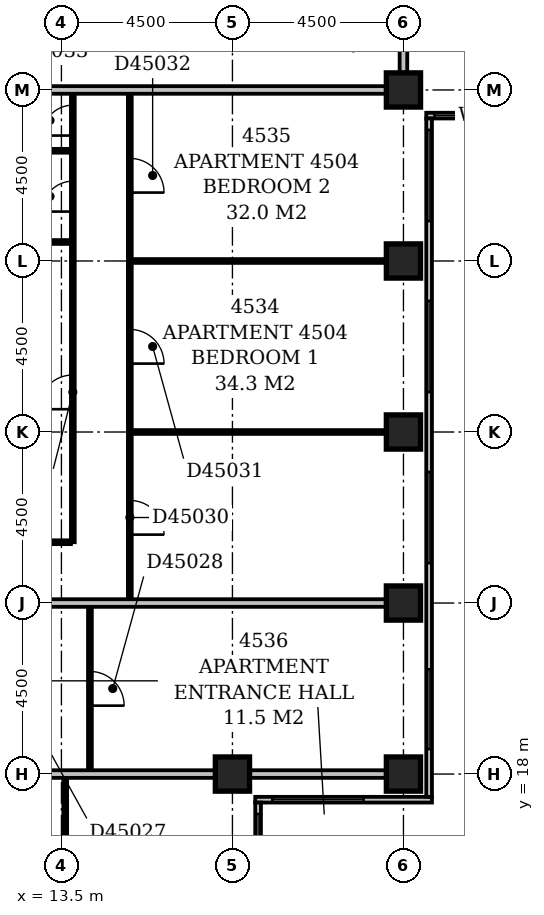
"""IFC4 building model, lengths in metres.
Left out: names, types, materials, properties, quantities, classifications, styles, units other than length and angle.
Written with IfcOpenShell. Run it as: python <this file> out.ifc"""

import sys

from ifc_helpers import new_model, si_unit, direction, frame, frame_2d, origin, origin_2d, place, context, subcontext, project, spatial, rectangle, extrude, element, fill, save


model = new_model("IFC4")
c1 = context("Model", 3, precision=1e-05, world=origin(), true_north=direction((0.0, 1.0)))
c2 = subcontext(c1, "Body", "Model", "MODEL_VIEW")
j1 = project(units=[si_unit("LENGTHUNIT", "METRE"), si_unit("PLANEANGLEUNIT", "RADIAN")], contexts=[c1])
p1 = place(None, origin())
s1 = spatial("IfcSite", under=j1, at=p1, CompositionType="ELEMENT")
p2 = place(p1, origin())
s2 = spatial("IfcBuilding", under=s1, at=p2, CompositionType="ELEMENT")
p3 = place(p2, frame((0.0, 0.0, 179.0)))
s3 = spatial("IfcBuildingStorey", under=s2, at=p3, CompositionType="ELEMENT", Elevation=179.0)
for number, where, z_axis, x_axis in (
    (1, (18.0, 18.0, -0.3), (0.0, 0.0, 1.0), (1.0, 0.0, 0.0)),
    (2, (22.5, 18.0, -0.3), (0.0, 0.0, 1.0), (1.0, 0.0, 0.0)),
    (3, (22.5, 22.5, -0.3), (0.0, 0.0, 1.0), (1.0, 0.0, 0.0)),
    (4, (22.5, 27.0, -0.3), (0.0, 0.0, 1.0), (1.0, 0.0, 0.0)),
    (5, (22.5, 31.5, -0.3), (0.0, 0.0, 1.0), (1.0, 0.0, 0.0)),
    (6, (22.5, 36.0, -0.3), (0.0, 0.0, 1.0), (1.0, 0.0, 0.0)),
):
    element("IfcColumn", number, at=place(p3, frame(where, z_axis=z_axis, x_axis=x_axis)), inside=s3, PredefinedType="COLUMN", context=c2, shape_type="SweptSolid", body=[
        extrude(rectangle(XDim=0.9, YDim=0.9, at=origin_2d()), origin(), (0.0, 0.0, 1.0), 3.6),
    ])
p4 = place(p3, frame((18.675, 8.4, 0.0), z_axis=(0.0, 0.0, 1.0), x_axis=(0.0, 1.0, 0.0)))
e7 = element("IfcWall", 7, at=p4, inside=s3, PredefinedType="STANDARD", context=c2, shape_type="SweptSolid", body=[
    extrude(rectangle(XDim=8.85, YDim=0.15, at=frame_2d((4.425, 0.0))), origin(), (0.0, 0.0, 1.0), 2.7),
])
p5 = place(p4, frame((1.291, 0.0, 0.6)))
e8 = element("IfcOpeningElement", 8, at=p5, cuts=e7, PredefinedType="OPENING", context=c2, shape_type="SweptSolid", body=[
    extrude(rectangle(XDim=0.45, YDim=1.8, at=frame_2d((0.225, 0.9))), frame((0.0, 0.087, 0.0), z_axis=(0.0, -1.0, 0.0), x_axis=(1.0, 0.0, 0.0)), (0.0, 0.0, 1.0), 0.174),
])
p6 = place(p4, frame((2.941, 0.0, 0.6)))
e9 = element("IfcOpeningElement", 9, at=p6, cuts=e7, PredefinedType="OPENING", context=c2, shape_type="SweptSolid", body=[
    extrude(rectangle(XDim=1.5, YDim=1.8, at=frame_2d((0.75, 0.9))), frame((0.0, 0.087, 0.0), z_axis=(0.0, -1.0, 0.0), x_axis=(1.0, 0.0, 0.0)), (0.0, 0.0, 1.0), 0.174),
])
p7 = place(p4, frame((6.15, 0.0, 0.6)))
e10 = element("IfcOpeningElement", 10, at=p7, cuts=e7, PredefinedType="OPENING", context=c2, shape_type="SweptSolid", body=[
    extrude(rectangle(XDim=2.4, YDim=1.8, at=frame_2d((1.2, 0.9))), frame((0.0, 0.087, 0.0), z_axis=(0.0, -1.0, 0.0), x_axis=(1.0, 0.0, 0.0)), (0.0, 0.0, 1.0), 0.174),
])
p8 = place(p3, frame((18.6, 17.325, 0.0), z_axis=(0.0, 0.0, 1.0), x_axis=(1.0, 0.0, 0.0)))
e11 = element("IfcWall", 11, at=p8, inside=s3, PredefinedType="STANDARD", context=c2, shape_type="SweptSolid", body=[
    extrude(rectangle(XDim=4.65, YDim=0.15, at=frame_2d((2.325, 0.0))), origin(), (0.0, 0.0, 1.0), 2.7),
])
p9 = place(p8, frame((0.45, 0.0, 0.6)))
e12 = element("IfcOpeningElement", 12, at=p9, cuts=e11, PredefinedType="OPENING", context=c2, shape_type="SweptSolid", body=[
    extrude(rectangle(XDim=2.4, YDim=1.8, at=frame_2d((1.2, 0.9))), frame((0.0, 0.087, 0.0), z_axis=(0.0, -1.0, 0.0), x_axis=(1.0, 0.0, 0.0)), (0.0, 0.0, 1.0), 0.174),
])
p10 = place(p3, frame((23.175, 17.4, 0.0), z_axis=(0.0, 0.0, 1.0), x_axis=(0.0, 1.0, 0.0)))
e13 = element("IfcWall", 13, at=p10, inside=s3, PredefinedType="STANDARD", context=c2, shape_type="SweptSolid", body=[
    extrude(rectangle(XDim=17.85, YDim=0.15, at=frame_2d((8.925, 0.0))), origin(), (0.0, 0.0, 1.0), 2.7),
])
p11 = place(p10, frame((1.257, 0.0, 0.6)))
e14 = element("IfcOpeningElement", 14, at=p11, cuts=e13, PredefinedType="OPENING", context=c2, shape_type="SweptSolid", body=[
    extrude(rectangle(XDim=2.1, YDim=1.8, at=frame_2d((1.05, 0.9))), frame((0.0, 0.087, 0.0), z_axis=(0.0, -1.0, 0.0), x_axis=(1.0, 0.0, 0.0)), (0.0, 0.0, 1.0), 0.174),
])
p12 = place(p10, frame((6.15, 0.0, 0.6)))
e15 = element("IfcOpeningElement", 15, at=p12, cuts=e13, PredefinedType="OPENING", context=c2, shape_type="SweptSolid", body=[
    extrude(rectangle(XDim=2.4, YDim=1.8, at=frame_2d((1.2, 0.9))), frame((0.0, 0.087, 0.0), z_axis=(0.0, -1.0, 0.0), x_axis=(1.0, 0.0, 0.0)), (0.0, 0.0, 1.0), 0.174),
])
p13 = place(p10, frame((10.65, 0.0, 0.6)))
e16 = element("IfcOpeningElement", 16, at=p13, cuts=e13, PredefinedType="OPENING", context=c2, shape_type="SweptSolid", body=[
    extrude(rectangle(XDim=2.4, YDim=1.8, at=frame_2d((1.2, 0.9))), frame((0.0, 0.087, 0.0), z_axis=(0.0, -1.0, 0.0), x_axis=(1.0, 0.0, 0.0)), (0.0, 0.0, 1.0), 0.174),
])
p14 = place(p10, frame((15.15, 0.0, 0.6)))
e17 = element("IfcOpeningElement", 17, at=p14, cuts=e13, PredefinedType="OPENING", context=c2, shape_type="SweptSolid", body=[
    extrude(rectangle(XDim=2.4, YDim=1.8, at=frame_2d((1.2, 0.9))), frame((0.0, 0.087, 0.0), z_axis=(0.0, -1.0, 0.0), x_axis=(1.0, 0.0, 0.0)), (0.0, 0.0, 1.0), 0.174),
])
p15 = place(p3, frame((23.1, 35.325, 0.0), z_axis=(0.0, 0.0, 1.0), x_axis=(1.0, 0.0, 0.0)))
e18 = element("IfcWall", 18, at=p15, inside=s3, PredefinedType="STANDARD", context=c2, shape_type="SweptSolid", body=[
    extrude(rectangle(XDim=45.15, YDim=0.15, at=frame_2d((22.575, 0.0))), origin(), (0.0, 0.0, 1.0), 2.7),
])
p16 = place(p15, frame((0.217, 0.0, 0.6)))
e19 = element("IfcOpeningElement", 19, at=p16, cuts=e18, PredefinedType="OPENING", context=c2, shape_type="SweptSolid", body=[
    extrude(rectangle(XDim=2.1, YDim=1.8, at=frame_2d((1.05, 0.9))), frame((0.0, 0.087, 0.0), z_axis=(0.0, -1.0, 0.0), x_axis=(1.0, 0.0, 0.0)), (0.0, 0.0, 1.0), 0.174),
])
p17 = place(p15, frame((4.95, 0.0, 0.6)))
e20 = element("IfcOpeningElement", 20, at=p17, cuts=e18, PredefinedType="OPENING", context=c2, shape_type="SweptSolid", body=[
    extrude(rectangle(XDim=2.4, YDim=1.8, at=frame_2d((1.2, 0.9))), frame((0.0, 0.087, 0.0), z_axis=(0.0, -1.0, 0.0), x_axis=(1.0, 0.0, 0.0)), (0.0, 0.0, 1.0), 0.174),
])
p18 = place(p15, frame((9.45, 0.0, 0.6)))
e21 = element("IfcOpeningElement", 21, at=p18, cuts=e18, PredefinedType="OPENING", context=c2, shape_type="SweptSolid", body=[
    extrude(rectangle(XDim=2.4, YDim=1.8, at=frame_2d((1.2, 0.9))), frame((0.0, 0.087, 0.0), z_axis=(0.0, -1.0, 0.0), x_axis=(1.0, 0.0, 0.0)), (0.0, 0.0, 1.0), 0.174),
])
p19 = place(p15, frame((13.95, 0.0, 0.6)))
e22 = element("IfcOpeningElement", 22, at=p19, cuts=e18, PredefinedType="OPENING", context=c2, shape_type="SweptSolid", body=[
    extrude(rectangle(XDim=2.4, YDim=1.8, at=frame_2d((1.2, 0.9))), frame((0.0, 0.087, 0.0), z_axis=(0.0, -1.0, 0.0), x_axis=(1.0, 0.0, 0.0)), (0.0, 0.0, 1.0), 0.174),
])
p20 = place(p15, frame((18.45, 0.0, 0.6)))
e23 = element("IfcOpeningElement", 23, at=p20, cuts=e18, PredefinedType="OPENING", context=c2, shape_type="SweptSolid", body=[
    extrude(rectangle(XDim=2.4, YDim=1.8, at=frame_2d((1.2, 0.9))), frame((0.0, 0.087, 0.0), z_axis=(0.0, -1.0, 0.0), x_axis=(1.0, 0.0, 0.0)), (0.0, 0.0, 1.0), 0.174),
])
p21 = place(p15, frame((24.403, 0.0, 0.6)))
e24 = element("IfcOpeningElement", 24, at=p21, cuts=e18, PredefinedType="OPENING", context=c2, shape_type="SweptSolid", body=[
    extrude(rectangle(XDim=1.2, YDim=1.8, at=frame_2d((0.6, 0.9))), frame((0.0, 0.087, 0.0), z_axis=(0.0, -1.0, 0.0), x_axis=(1.0, 0.0, 0.0)), (0.0, 0.0, 1.0), 0.174),
])
p22 = place(p15, frame((27.141, 0.0, 0.6)))
e25 = element("IfcOpeningElement", 25, at=p22, cuts=e18, PredefinedType="OPENING", context=c2, shape_type="SweptSolid", body=[
    extrude(rectangle(XDim=2.1, YDim=1.8, at=frame_2d((1.05, 0.9))), frame((0.0, 0.087, 0.0), z_axis=(0.0, -1.0, 0.0), x_axis=(1.0, 0.0, 0.0)), (0.0, 0.0, 1.0), 0.174),
])
p23 = place(p15, frame((31.95, 0.0, 0.6)))
e26 = element("IfcOpeningElement", 26, at=p23, cuts=e18, PredefinedType="OPENING", context=c2, shape_type="SweptSolid", body=[
    extrude(rectangle(XDim=2.4, YDim=1.8, at=frame_2d((1.2, 0.9))), frame((0.0, 0.087, 0.0), z_axis=(0.0, -1.0, 0.0), x_axis=(1.0, 0.0, 0.0)), (0.0, 0.0, 1.0), 0.174),
])
p24 = place(p15, frame((36.45, 0.0, 0.6)))
e27 = element("IfcOpeningElement", 27, at=p24, cuts=e18, PredefinedType="OPENING", context=c2, shape_type="SweptSolid", body=[
    extrude(rectangle(XDim=2.4, YDim=1.8, at=frame_2d((1.2, 0.9))), frame((0.0, 0.087, 0.0), z_axis=(0.0, -1.0, 0.0), x_axis=(1.0, 0.0, 0.0)), (0.0, 0.0, 1.0), 0.174),
])
p25 = place(p15, frame((40.95, 0.0, 0.6)))
e28 = element("IfcOpeningElement", 28, at=p25, cuts=e18, PredefinedType="OPENING", context=c2, shape_type="SweptSolid", body=[
    extrude(rectangle(XDim=2.4, YDim=1.8, at=frame_2d((1.2, 0.9))), frame((0.0, 0.087, 0.0), z_axis=(0.0, -1.0, 0.0), x_axis=(1.0, 0.0, 0.0)), (0.0, 0.0, 1.0), 0.174),
])
p26 = place(p3, frame((13.6, 9.45, 0.0), z_axis=(0.0, 0.0, 1.0), x_axis=(0.0, 1.0, 0.0)))
e29 = element("IfcWall", 29, at=p26, inside=s3, PredefinedType="PARTITIONING", context=c2, shape_type="SweptSolid", body=[
    extrude(rectangle(XDim=8.45, YDim=0.1, at=frame_2d((4.225, 0.0))), origin(), (0.0, 0.0, 1.0), 3.3),
])
p27 = place(p26, frame((1.35, 0.0, 0.0)))
e30 = element("IfcOpeningElement", 30, at=p27, cuts=e29, PredefinedType="OPENING", context=c2, shape_type="SweptSolid", body=[
    extrude(rectangle(XDim=0.9, YDim=2.1, at=frame_2d((0.45, 1.05))), frame((0.0, 0.062, 0.0), z_axis=(0.0, -1.0, 0.0), x_axis=(1.0, 0.0, 0.0)), (0.0, 0.0, 1.0), 0.124),
])
p28 = place(p26, frame((5.85, 0.0, 0.0)))
e31 = element("IfcOpeningElement", 31, at=p28, cuts=e29, PredefinedType="OPENING", context=c2, shape_type="SweptSolid", body=[
    extrude(rectangle(XDim=0.9, YDim=2.1, at=frame_2d((0.45, 1.05))), frame((0.0, 0.062, 0.0), z_axis=(0.0, -1.0, 0.0), x_axis=(1.0, 0.0, 0.0)), (0.0, 0.0, 1.0), 0.124),
])
p29 = place(p3, frame((9.1, 18.0, 0.0), z_axis=(0.0, 0.0, 1.0), x_axis=(1.0, 0.0, 0.0)))
e32 = element("IfcWall", 32, at=p29, inside=s3, PredefinedType="PARTITIONING", context=c2, shape_type="SweptSolid", body=[
    extrude(rectangle(XDim=8.45, YDim=0.2, at=frame_2d((4.225, 0.0))), origin(), (0.0, 0.0, 1.0), 2.6),
])
p30 = place(p3, frame((18.45, 18.0, 0.0), z_axis=(0.0, 0.0, 1.0), x_axis=(1.0, 0.0, 0.0)))
e33 = element("IfcWall", 33, at=p30, inside=s3, PredefinedType="PARTITIONING", context=c2, shape_type="SweptSolid", body=[
    extrude(rectangle(XDim=3.6, YDim=0.2, at=frame_2d((1.8, 0.0))), origin(), (0.0, 0.0, 1.0), 2.7),
])
p31 = place(p3, frame((14.25, 18.1, 0.0), z_axis=(0.0, 0.0, 1.0), x_axis=(0.0, 1.0, 0.0)))
e34 = element("IfcWall", 34, at=p31, inside=s3, PredefinedType="PARTITIONING", context=c2, shape_type="SweptSolid", body=[
    extrude(rectangle(XDim=4.3, YDim=0.1, at=frame_2d((2.15, 0.0))), origin(), (0.0, 0.0, 1.0), 3.3),
])
p32 = place(p31, frame((1.7, 0.0, 0.0)))
e35 = element("IfcOpeningElement", 35, at=p32, cuts=e34, PredefinedType="OPENING", context=c2, shape_type="SweptSolid", body=[
    extrude(rectangle(XDim=0.9, YDim=2.1, at=frame_2d((0.45, 1.05))), frame((0.0, 0.062, 0.0), z_axis=(0.0, -1.0, 0.0), x_axis=(1.0, 0.0, 0.0)), (0.0, 0.0, 1.0), 0.124),
])
p33 = place(p3, frame((9.1, 22.5, 0.0), z_axis=(0.0, 0.0, 1.0), x_axis=(1.0, 0.0, 0.0)))
e36 = element("IfcWall", 36, at=p33, inside=s3, PredefinedType="PARTITIONING", context=c2, shape_type="SweptSolid", body=[
    extrude(rectangle(XDim=12.95, YDim=0.2, at=frame_2d((6.475, 0.0))), origin(), (0.0, 0.0, 1.0), 3.3),
])
p34 = place(p3, frame((15.3, 22.6, 0.0), z_axis=(0.0, 0.0, 1.0), x_axis=(0.0, 1.0, 0.0)))
e37 = element("IfcWall", 37, at=p34, inside=s3, PredefinedType="PARTITIONING", context=c2, shape_type="SweptSolid", body=[
    extrude(rectangle(XDim=13.3, YDim=0.1, at=frame_2d((6.65, 0.0))), origin(), (0.0, 0.0, 1.0), 3.3),
])
p35 = place(p34, frame((1.7, 0.0, 0.0)))
e38 = element("IfcOpeningElement", 38, at=p35, cuts=e37, PredefinedType="OPENING", context=c2, shape_type="SweptSolid", body=[
    extrude(rectangle(XDim=0.9, YDim=2.1, at=frame_2d((0.45, 1.05))), frame((0.0, 0.062, 0.0), z_axis=(0.0, -1.0, 0.0), x_axis=(1.0, 0.0, 0.0)), (0.0, 0.0, 1.0), 0.124),
])
p36 = place(p34, frame((6.2, 0.0, 0.0)))
e39 = element("IfcOpeningElement", 39, at=p36, cuts=e37, PredefinedType="OPENING", context=c2, shape_type="SweptSolid", body=[
    extrude(rectangle(XDim=0.9, YDim=2.1, at=frame_2d((0.45, 1.05))), frame((0.0, 0.062, 0.0), z_axis=(0.0, -1.0, 0.0), x_axis=(1.0, 0.0, 0.0)), (0.0, 0.0, 1.0), 0.124),
])
p37 = place(p34, frame((10.7, 0.0, 0.0)))
e40 = element("IfcOpeningElement", 40, at=p37, cuts=e37, PredefinedType="OPENING", context=c2, shape_type="SweptSolid", body=[
    extrude(rectangle(XDim=0.9, YDim=2.1, at=frame_2d((0.45, 1.05))), frame((0.0, 0.062, 0.0), z_axis=(0.0, -1.0, 0.0), x_axis=(1.0, 0.0, 0.0)), (0.0, 0.0, 1.0), 0.124),
])
p38 = place(p3, frame((9.1, 24.1, 0.0), z_axis=(0.0, 0.0, 1.0), x_axis=(1.0, 0.0, 0.0)))
e41 = element("IfcWall", 41, at=p38, inside=s3, PredefinedType="PARTITIONING", context=c2, shape_type="SweptSolid", body=[
    extrude(rectangle(XDim=4.65, YDim=0.1, at=frame_2d((2.325, 0.0))), origin(), (0.0, 0.0, 1.0), 3.3),
])
p39 = place(p3, frame((13.8, 24.1, 0.0), z_axis=(0.0, 0.0, 1.0), x_axis=(0.0, 1.0, 0.0)))
e42 = element("IfcWall", 42, at=p39, inside=s3, PredefinedType="PARTITIONING", context=c2, shape_type="SweptSolid", body=[
    extrude(rectangle(XDim=11.8, YDim=0.1, at=frame_2d((5.9, 0.0))), origin(), (0.0, 0.0, 1.0), 3.3),
])
p40 = place(p39, frame((8.7, 0.0, 0.0)))
e43 = element("IfcOpeningElement", 43, at=p40, cuts=e42, PredefinedType="OPENING", context=c2, shape_type="SweptSolid", body=[
    extrude(rectangle(XDim=0.8, YDim=2.1, at=frame_2d((0.4, 1.05))), frame((0.0, 0.062, 0.0), z_axis=(0.0, -1.0, 0.0), x_axis=(1.0, 0.0, 0.0)), (0.0, 0.0, 1.0), 0.124),
])
p41 = place(p39, frame((3.5, 0.0, 0.0)))
e44 = element("IfcOpeningElement", 44, at=p41, cuts=e42, PredefinedType="OPENING", context=c2, shape_type="SweptSolid", body=[
    extrude(rectangle(XDim=0.9, YDim=2.1, at=frame_2d((0.45, 1.05))), frame((0.0, 0.062, 0.0), z_axis=(0.0, -1.0, 0.0), x_axis=(1.0, 0.0, 0.0)), (0.0, 0.0, 1.0), 0.124),
])
p42 = place(p39, frame((10.7, 0.0, 0.0)))
e45 = element("IfcOpeningElement", 45, at=p42, cuts=e42, PredefinedType="OPENING", context=c2, shape_type="SweptSolid", body=[
    extrude(rectangle(XDim=0.8, YDim=2.1, at=frame_2d((0.4, 1.05))), frame((0.0, 0.062, 0.0), z_axis=(0.0, -1.0, 0.0), x_axis=(1.0, 0.0, 0.0)), (0.0, 0.0, 1.0), 0.124),
])
p43 = place(p3, frame((15.35, 27.0, 0.0), z_axis=(0.0, 0.0, 1.0), x_axis=(1.0, 0.0, 0.0)))
e46 = element("IfcWall", 46, at=p43, inside=s3, PredefinedType="PARTITIONING", context=c2, shape_type="SweptSolid", body=[
    extrude(rectangle(XDim=6.7, YDim=0.1, at=frame_2d((3.35, 0.0))), origin(), (0.0, 0.0, 1.0), 2.7),
])
p44 = place(p3, frame((15.35, 31.5, 0.0), z_axis=(0.0, 0.0, 1.0), x_axis=(1.0, 0.0, 0.0)))
e47 = element("IfcWall", 47, at=p44, inside=s3, PredefinedType="PARTITIONING", context=c2, shape_type="SweptSolid", body=[
    extrude(rectangle(XDim=6.7, YDim=0.1, at=frame_2d((3.35, 0.0))), origin(), (0.0, 0.0, 1.0), 3.3),
])
for number, where, z_axis, x_axis in (
    (48, (9.1, 32.0, 0.0), (0.0, 0.0, 1.0), (1.0, 0.0, 0.0)),
    (49, (9.1, 34.4, 0.0), (0.0, 0.0, 1.0), (1.0, 0.0, 0.0)),
):
    element("IfcWall", number, at=place(p3, frame(where, z_axis=z_axis, x_axis=x_axis)), inside=s3, PredefinedType="PLUMBINGWALL", context=c2, shape_type="SweptSolid", body=[
        extrude(rectangle(XDim=4.65, YDim=0.1, at=frame_2d((2.325, 0.0))), origin(), (0.0, 0.0, 1.0), 3.3),
    ])
p45 = place(p3, frame((9.1, 36.0, 0.0), z_axis=(0.0, 0.0, 1.0), x_axis=(1.0, 0.0, 0.0)))
e50 = element("IfcWall", 50, at=p45, inside=s3, PredefinedType="PARTITIONING", context=c2, shape_type="SweptSolid", body=[
    extrude(rectangle(XDim=12.95, YDim=0.2, at=frame_2d((6.475, 0.0))), origin(), (0.0, 0.0, 1.0), 3.3),
])
p46 = place(p3, frame((22.5, 36.45, 0.0), z_axis=(0.0, 0.0, 1.0), x_axis=(0.0, 1.0, 0.0)))
e51 = element("IfcWall", 51, at=p46, inside=s3, PredefinedType="PARTITIONING", context=c2, shape_type="SweptSolid", body=[
    extrude(rectangle(XDim=13.05, YDim=0.2, at=frame_2d((6.525, 0.0))), origin(), (0.0, 0.0, 1.0), 3.3),
])
p47 = place(p7, origin())
e52 = element("IfcWindow", 52, at=p47, inside=s3, PartitioningType="SINGLE_PANEL", PredefinedType="WINDOW", context=c2, shape_type="SweptSolid", body=[
    extrude(rectangle(XDim=2.4, YDim=1.8, at=frame_2d((1.2, 0.9))), frame((0.0, 0.03, 0.0), z_axis=(0.0, -1.0, 0.0), x_axis=(1.0, 0.0, 0.0)), (0.0, 0.0, 1.0), 0.06),
])
fill(e10, e52)
p48 = place(p9, origin())
e53 = element("IfcWindow", 53, at=p48, inside=s3, PartitioningType="SINGLE_PANEL", PredefinedType="WINDOW", context=c2, shape_type="SweptSolid", body=[
    extrude(rectangle(XDim=2.4, YDim=1.8, at=frame_2d((1.2, 0.9))), frame((0.0, 0.03, 0.0), z_axis=(0.0, -1.0, 0.0), x_axis=(1.0, 0.0, 0.0)), (0.0, 0.0, 1.0), 0.06),
])
fill(e12, e53)
p49 = place(p11, origin())
e54 = element("IfcWindow", 54, at=p49, inside=s3, PartitioningType="SINGLE_PANEL", PredefinedType="WINDOW", context=c2, shape_type="SweptSolid", body=[
    extrude(rectangle(XDim=2.1, YDim=1.8, at=frame_2d((1.05, 0.9))), frame((0.0, 0.03, 0.0), z_axis=(0.0, -1.0, 0.0), x_axis=(1.0, 0.0, 0.0)), (0.0, 0.0, 1.0), 0.06),
])
fill(e14, e54)
p50 = place(p12, origin())
e55 = element("IfcWindow", 55, at=p50, inside=s3, PartitioningType="SINGLE_PANEL", PredefinedType="WINDOW", context=c2, shape_type="SweptSolid", body=[
    extrude(rectangle(XDim=2.4, YDim=1.8, at=frame_2d((1.2, 0.9))), frame((0.0, 0.03, 0.0), z_axis=(0.0, -1.0, 0.0), x_axis=(1.0, 0.0, 0.0)), (0.0, 0.0, 1.0), 0.06),
])
fill(e15, e55)
p51 = place(p13, origin())
e56 = element("IfcWindow", 56, at=p51, inside=s3, PartitioningType="SINGLE_PANEL", PredefinedType="WINDOW", context=c2, shape_type="SweptSolid", body=[
    extrude(rectangle(XDim=2.4, YDim=1.8, at=frame_2d((1.2, 0.9))), frame((0.0, 0.03, 0.0), z_axis=(0.0, -1.0, 0.0), x_axis=(1.0, 0.0, 0.0)), (0.0, 0.0, 1.0), 0.06),
])
fill(e16, e56)
p52 = place(p14, origin())
e57 = element("IfcWindow", 57, at=p52, inside=s3, PartitioningType="SINGLE_PANEL", PredefinedType="WINDOW", context=c2, shape_type="SweptSolid", body=[
    extrude(rectangle(XDim=2.4, YDim=1.8, at=frame_2d((1.2, 0.9))), frame((0.0, 0.03, 0.0), z_axis=(0.0, -1.0, 0.0), x_axis=(1.0, 0.0, 0.0)), (0.0, 0.0, 1.0), 0.06),
])
fill(e17, e57)
p53 = place(p16, origin())
e58 = element("IfcWindow", 58, at=p53, inside=s3, PartitioningType="SINGLE_PANEL", PredefinedType="WINDOW", context=c2, shape_type="SweptSolid", body=[
    extrude(rectangle(XDim=2.1, YDim=1.8, at=frame_2d((1.05, 0.9))), frame((0.0, 0.03, 0.0), z_axis=(0.0, -1.0, 0.0), x_axis=(1.0, 0.0, 0.0)), (0.0, 0.0, 1.0), 0.06),
])
fill(e19, e58)
p54 = place(p32, frame((0.9, 0.0, 0.0), z_axis=(0.0, 0.0, 1.0), x_axis=(-1.0, 0.0, 0.0)))
e59 = element("IfcDoor", 59, at=p54, inside=s3, OperationType="SINGLE_SWING_RIGHT", PredefinedType="DOOR", context=c2, shape_type="SweptSolid", body=[
    extrude(rectangle(XDim=0.9, YDim=2.1, at=frame_2d((0.45, 1.05))), frame((0.0, 0.025, 0.0), z_axis=(0.0, -1.0, 0.0), x_axis=(1.0, 0.0, 0.0)), (0.0, 0.0, 1.0), 0.05),
])
fill(e35, e59)
p55 = place(p35, frame((0.9, 0.0, 0.0), z_axis=(0.0, 0.0, 1.0), x_axis=(-1.0, 0.0, 0.0)))
e60 = element("IfcDoor", 60, at=p55, inside=s3, OperationType="SINGLE_SWING_RIGHT", PredefinedType="DOOR", context=c2, shape_type="SweptSolid", body=[
    extrude(rectangle(XDim=0.9, YDim=2.1, at=frame_2d((0.45, 1.05))), frame((0.0, 0.025, 0.0), z_axis=(0.0, -1.0, 0.0), x_axis=(1.0, 0.0, 0.0)), (0.0, 0.0, 1.0), 0.05),
])
fill(e38, e60)
p56 = place(p36, frame((0.9, 0.0, 0.0), z_axis=(0.0, 0.0, 1.0), x_axis=(-1.0, 0.0, 0.0)))
e61 = element("IfcDoor", 61, at=p56, inside=s3, OperationType="SINGLE_SWING_RIGHT", PredefinedType="DOOR", context=c2, shape_type="SweptSolid", body=[
    extrude(rectangle(XDim=0.9, YDim=2.1, at=frame_2d((0.45, 1.05))), frame((0.0, 0.025, 0.0), z_axis=(0.0, -1.0, 0.0), x_axis=(1.0, 0.0, 0.0)), (0.0, 0.0, 1.0), 0.05),
])
fill(e39, e61)
p57 = place(p37, frame((0.9, 0.0, 0.0), z_axis=(0.0, 0.0, 1.0), x_axis=(-1.0, 0.0, 0.0)))
e62 = element("IfcDoor", 62, at=p57, inside=s3, OperationType="SINGLE_SWING_RIGHT", PredefinedType="DOOR", context=c2, shape_type="SweptSolid", body=[
    extrude(rectangle(XDim=0.9, YDim=2.1, at=frame_2d((0.45, 1.05))), frame((0.0, 0.025, 0.0), z_axis=(0.0, -1.0, 0.0), x_axis=(1.0, 0.0, 0.0)), (0.0, 0.0, 1.0), 0.05),
])
fill(e40, e62)
p58 = place(p40, origin())
e63 = element("IfcDoor", 63, at=p58, inside=s3, OperationType="SINGLE_SWING_LEFT", PredefinedType="DOOR", context=c2, shape_type="SweptSolid", body=[
    extrude(rectangle(XDim=0.8, YDim=2.1, at=frame_2d((0.4, 1.05))), frame((0.0, 0.025, 0.0), z_axis=(0.0, -1.0, 0.0), x_axis=(1.0, 0.0, 0.0)), (0.0, 0.0, 1.0), 0.05),
])
fill(e43, e63)
p59 = place(p41, origin())
e64 = element("IfcDoor", 64, at=p59, inside=s3, OperationType="SINGLE_SWING_LEFT", PredefinedType="DOOR", context=c2, shape_type="SweptSolid", body=[
    extrude(rectangle(XDim=0.9, YDim=2.1, at=frame_2d((0.45, 1.05))), frame((0.0, 0.025, 0.0), z_axis=(0.0, -1.0, 0.0), x_axis=(1.0, 0.0, 0.0)), (0.0, 0.0, 1.0), 0.05),
])
fill(e44, e64)
p60 = place(p42, origin())
e65 = element("IfcDoor", 65, at=p60, inside=s3, OperationType="SINGLE_SWING_LEFT", PredefinedType="DOOR", context=c2, shape_type="SweptSolid", body=[
    extrude(rectangle(XDim=0.8, YDim=2.1, at=frame_2d((0.4, 1.05))), frame((0.0, 0.025, 0.0), z_axis=(0.0, -1.0, 0.0), x_axis=(1.0, 0.0, 0.0)), (0.0, 0.0, 1.0), 0.05),
])
fill(e45, e65)
save(model, sys.argv[1])
